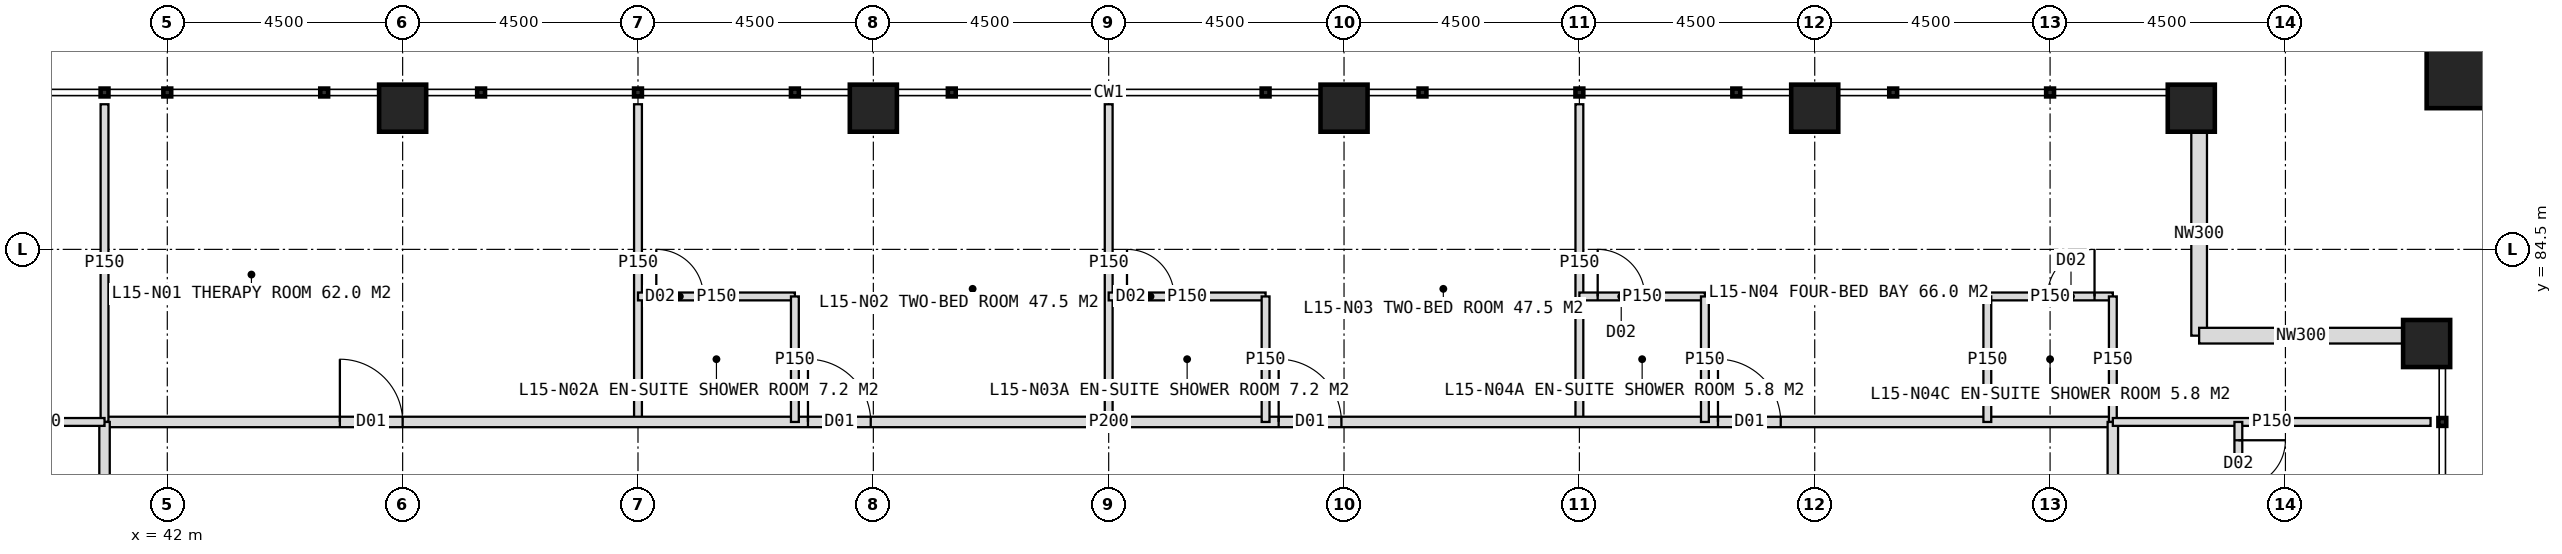
"""IFC4 building model, lengths in metres.
Left out: names, types, materials, properties, quantities, classifications, styles, units other than length and angle.
Written with IfcOpenShell. Run it as: python <this file> out.ifc"""

import sys

from ifc_helpers import new_model, si_unit, direction, frame, frame_2d, origin, origin_2d, place, context, subcontext, project, spatial, rectangle, hollow_rectangle, extrude, element, fill, save


model = new_model("IFC4")
c1 = context("Model", 3, precision=1e-05, world=origin(), true_north=direction((0.0, 1.0)))
c2 = subcontext(c1, "Body", "Model", "MODEL_VIEW")
j1 = project(units=[si_unit("LENGTHUNIT", "METRE"), si_unit("PLANEANGLEUNIT", "RADIAN")], contexts=[c1])
p1 = place(None, origin())
s1 = spatial("IfcSite", under=j1, at=p1, CompositionType="ELEMENT")
p2 = place(p1, origin())
s2 = spatial("IfcBuilding", under=s1, at=p2, CompositionType="ELEMENT")
p3 = place(p2, frame((0.0, 0.0, 67.0)))
s3 = spatial("IfcBuildingStorey", under=s2, at=p3, CompositionType="ELEMENT", Elevation=67.0)
for number, where, z_axis, x_axis in (
    (1, (46.5, 87.2, 0.0), (0.0, 0.0, 1.0), (1.0, 0.0, 0.0)),
    (2, (55.5, 87.2, 0.0), (0.0, 0.0, 1.0), (1.0, 0.0, 0.0)),
    (3, (64.5, 87.2, 0.0), (0.0, 0.0, 1.0), (1.0, 0.0, 0.0)),
    (4, (73.5, 87.2, 0.0), (0.0, 0.0, 1.0), (1.0, 0.0, 0.0)),
    (5, (80.7, 87.2, 0.0), (0.0, 0.0, 1.0), (1.0, 0.0, 0.0)),
    (6, (85.2, 82.7, 0.0), (0.0, 0.0, 1.0), (1.0, 0.0, 0.0)),
):
    element("IfcColumn", number, at=place(p3, frame(where, z_axis=z_axis, x_axis=x_axis)), inside=s3, PredefinedType="COLUMN", context=c2, shape_type="SweptSolid", body=[
        extrude(hollow_rectangle(XDim=0.9, YDim=0.9, WallThickness=0.08, at=origin_2d()), origin(), (0.0, 0.0, 1.0), 4.0),
    ])
p4 = place(p3, frame((86.1, 88.1, 0.0), z_axis=(0.0, 0.0, 1.0), x_axis=(1.0, 0.0, 0.0)))
e7 = element("IfcColumn", 7, at=p4, inside=s3, PredefinedType="COLUMN", context=c2, shape_type="SweptSolid", body=[
    extrude(hollow_rectangle(XDim=1.8, YDim=1.8, WallThickness=0.1, at=origin_2d()), origin(), (0.0, 0.0, 1.0), 4.0),
])
for number, where, z_axis, x_axis in (
    (8, (80.85, 86.75, 0.0), (0.0, 0.0, 1.0), (0.0, -1.0, 0.0)),
    (9, (80.85, 82.85, 0.0), (0.0, 0.0, 1.0), (1.0, 0.0, 0.0)),
):
    element("IfcWall", number, at=place(p3, frame(where, z_axis=z_axis, x_axis=x_axis)), inside=s3, PredefinedType="ELEMENTEDWALL", context=c2, shape_type="SweptSolid", body=[
        extrude(rectangle(XDim=3.9, YDim=0.3, at=frame_2d((1.95, 0.0))), origin(), (0.0, 0.0, 1.0), 2.95),
    ])
p5 = place(p3, frame((51.0, 81.2, 0.0), z_axis=(0.0, 0.0, 1.0), x_axis=(0.0, 1.0, 0.0)))
e10 = element("IfcWall", 10, at=p5, inside=s3, PredefinedType="PARTITIONING", context=c2, shape_type="SweptSolid", body=[
    extrude(rectangle(XDim=6.075, YDim=0.15, at=frame_2d((3.038, 0.0))), origin(), (0.0, 0.0, 1.0), 3.75),
])
p6 = place(p3, frame((60.0, 81.2, 0.0), z_axis=(0.0, 0.0, 1.0), x_axis=(0.0, 1.0, 0.0)))
e11 = element("IfcWall", 11, at=p6, inside=s3, PredefinedType="PARTITIONING", context=c2, shape_type="SweptSolid", body=[
    extrude(rectangle(XDim=6.075, YDim=0.15, at=frame_2d((3.038, 0.0))), origin(), (0.0, 0.0, 1.0), 2.75),
])
p7 = place(p3, frame((69.0, 81.2, 0.0), z_axis=(0.0, 0.0, 1.0), x_axis=(0.0, 1.0, 0.0)))
e12 = element("IfcWall", 12, at=p7, inside=s3, PredefinedType="PARTITIONING", context=c2, shape_type="SweptSolid", body=[
    extrude(rectangle(XDim=6.075, YDim=0.15, at=frame_2d((3.038, 0.0))), origin(), (0.0, 0.0, 1.0), 3.75),
])
p8 = place(p3, frame((40.8, 81.2, 0.0), z_axis=(0.0, 0.0, 1.0), x_axis=(1.0, 0.0, 0.0)))
e13 = element("IfcWall", 13, at=p8, inside=s3, PredefinedType="PARTITIONING", context=c2, shape_type="SweptSolid", body=[
    extrude(rectangle(XDim=38.4, YDim=0.2, at=frame_2d((19.2, 0.0))), origin(), (0.0, 0.0, 1.0), 3.75),
])
p9 = place(p8, frame((4.5, 0.0, 0.0)))
e14 = element("IfcOpeningElement", 14, at=p9, cuts=e13, PredefinedType="OPENING", context=c2, shape_type="SweptSolid", body=[
    extrude(rectangle(XDim=1.2, YDim=2.2, at=frame_2d((0.6, 1.1))), frame((0.0, 0.11, 0.0), z_axis=(0.0, -1.0, 0.0), x_axis=(1.0, 0.0, 0.0)), (0.0, 0.0, 1.0), 0.22),
])
p10 = place(p8, frame((13.45, 0.0, 0.0)))
e15 = element("IfcOpeningElement", 15, at=p10, cuts=e13, PredefinedType="OPENING", context=c2, shape_type="SweptSolid", body=[
    extrude(rectangle(XDim=1.2, YDim=2.2, at=frame_2d((0.6, 1.1))), frame((0.0, 0.11, 0.0), z_axis=(0.0, -1.0, 0.0), x_axis=(1.0, 0.0, 0.0)), (0.0, 0.0, 1.0), 0.22),
])
p11 = place(p8, frame((22.45, 0.0, 0.0)))
e16 = element("IfcOpeningElement", 16, at=p11, cuts=e13, PredefinedType="OPENING", context=c2, shape_type="SweptSolid", body=[
    extrude(rectangle(XDim=1.2, YDim=2.2, at=frame_2d((0.6, 1.1))), frame((0.0, 0.11, 0.0), z_axis=(0.0, -1.0, 0.0), x_axis=(1.0, 0.0, 0.0)), (0.0, 0.0, 1.0), 0.22),
])
p12 = place(p8, frame((30.85, 0.0, 0.0)))
e17 = element("IfcOpeningElement", 17, at=p12, cuts=e13, PredefinedType="OPENING", context=c2, shape_type="SweptSolid", body=[
    extrude(rectangle(XDim=1.2, YDim=2.2, at=frame_2d((0.6, 1.1))), frame((0.0, 0.11, 0.0), z_axis=(0.0, -1.0, 0.0), x_axis=(1.0, 0.0, 0.0)), (0.0, 0.0, 1.0), 0.22),
])
p13 = place(p3, frame((40.8, 81.2, 0.0), z_axis=(0.0, 0.0, 1.0), x_axis=(0.0, 1.0, 0.0)))
e18 = element("IfcWall", 18, at=p13, inside=s3, PredefinedType="PARTITIONING", context=c2, shape_type="SweptSolid", body=[
    extrude(rectangle(XDim=6.075, YDim=0.15, at=frame_2d((3.038, 0.0))), origin(), (0.0, 0.0, 1.0), 3.75),
])
p14 = place(p3, frame((51.0, 83.6, 0.0), z_axis=(0.0, 0.0, 1.0), x_axis=(1.0, 0.0, 0.0)))
e19 = element("IfcWall", 19, at=p14, inside=s3, PredefinedType="PARTITIONING", context=c2, shape_type="SweptSolid", body=[
    extrude(rectangle(XDim=3.0, YDim=0.15, at=frame_2d((1.5, 0.0))), origin(), (0.0, 0.0, 1.0), 3.75),
])
p15 = place(p14, frame((0.35, 0.0, 0.0)))
e20 = element("IfcOpeningElement", 20, at=p15, cuts=e19, PredefinedType="OPENING", context=c2, shape_type="SweptSolid", body=[
    extrude(rectangle(XDim=0.9, YDim=2.1, at=frame_2d((0.45, 1.05))), frame((0.0, 0.085, 0.0), z_axis=(0.0, -1.0, 0.0), x_axis=(1.0, 0.0, 0.0)), (0.0, 0.0, 1.0), 0.17),
])
p16 = place(p3, frame((54.0, 81.2, 0.0), z_axis=(0.0, 0.0, 1.0), x_axis=(0.0, 1.0, 0.0)))
e21 = element("IfcWall", 21, at=p16, inside=s3, PredefinedType="PARTITIONING", context=c2, shape_type="SweptSolid", body=[
    extrude(rectangle(XDim=2.4, YDim=0.15, at=frame_2d((1.2, 0.0))), origin(), (0.0, 0.0, 1.0), 3.75),
])
p17 = place(p3, frame((60.0, 83.6, 0.0), z_axis=(0.0, 0.0, 1.0), x_axis=(1.0, 0.0, 0.0)))
e22 = element("IfcWall", 22, at=p17, inside=s3, PredefinedType="PARTITIONING", context=c2, shape_type="SweptSolid", body=[
    extrude(rectangle(XDim=3.0, YDim=0.15, at=frame_2d((1.5, 0.0))), origin(), (0.0, 0.0, 1.0), 3.75),
])
p18 = place(p17, frame((0.35, 0.0, 0.0)))
e23 = element("IfcOpeningElement", 23, at=p18, cuts=e22, PredefinedType="OPENING", context=c2, shape_type="SweptSolid", body=[
    extrude(rectangle(XDim=0.9, YDim=2.1, at=frame_2d((0.45, 1.05))), frame((0.0, 0.085, 0.0), z_axis=(0.0, -1.0, 0.0), x_axis=(1.0, 0.0, 0.0)), (0.0, 0.0, 1.0), 0.17),
])
p19 = place(p3, frame((63.0, 81.2, 0.0), z_axis=(0.0, 0.0, 1.0), x_axis=(0.0, 1.0, 0.0)))
e24 = element("IfcWall", 24, at=p19, inside=s3, PredefinedType="PARTITIONING", context=c2, shape_type="SweptSolid", body=[
    extrude(rectangle(XDim=2.4, YDim=0.15, at=frame_2d((1.2, 0.0))), origin(), (0.0, 0.0, 1.0), 3.75),
])
p20 = place(p3, frame((69.0, 83.6, 0.0), z_axis=(0.0, 0.0, 1.0), x_axis=(1.0, 0.0, 0.0)))
e25 = element("IfcWall", 25, at=p20, inside=s3, PredefinedType="PARTITIONING", context=c2, shape_type="SweptSolid", body=[
    extrude(rectangle(XDim=2.4, YDim=0.15, at=frame_2d((1.2, 0.0))), origin(), (0.0, 0.0, 1.0), 3.75),
])
p21 = place(p20, frame((0.35, 0.0, 0.0)))
e26 = element("IfcOpeningElement", 26, at=p21, cuts=e25, PredefinedType="OPENING", context=c2, shape_type="SweptSolid", body=[
    extrude(rectangle(XDim=0.9, YDim=2.1, at=frame_2d((0.45, 1.05))), frame((0.0, 0.085, 0.0), z_axis=(0.0, -1.0, 0.0), x_axis=(1.0, 0.0, 0.0)), (0.0, 0.0, 1.0), 0.17),
])
p22 = place(p3, frame((71.4, 81.2, 0.0), z_axis=(0.0, 0.0, 1.0), x_axis=(0.0, 1.0, 0.0)))
e27 = element("IfcWall", 27, at=p22, inside=s3, PredefinedType="PARTITIONING", context=c2, shape_type="SweptSolid", body=[
    extrude(rectangle(XDim=2.4, YDim=0.15, at=frame_2d((1.2, 0.0))), origin(), (0.0, 0.0, 1.0), 3.75),
])
p23 = place(p3, frame((76.8, 83.6, 0.0), z_axis=(0.0, 0.0, 1.0), x_axis=(1.0, 0.0, 0.0)))
e28 = element("IfcWall", 28, at=p23, inside=s3, PredefinedType="PARTITIONING", context=c2, shape_type="SweptSolid", body=[
    extrude(rectangle(XDim=2.4, YDim=0.15, at=frame_2d((1.2, 0.0))), origin(), (0.0, 0.0, 1.0), 3.75),
])
p24 = place(p23, frame((1.15, 0.0, 0.0)))
e29 = element("IfcOpeningElement", 29, at=p24, cuts=e28, PredefinedType="OPENING", context=c2, shape_type="SweptSolid", body=[
    extrude(rectangle(XDim=0.9, YDim=2.1, at=frame_2d((0.45, 1.05))), frame((0.0, 0.085, 0.0), z_axis=(0.0, -1.0, 0.0), x_axis=(1.0, 0.0, 0.0)), (0.0, 0.0, 1.0), 0.17),
])
for number, where, z_axis, x_axis in (
    (30, (76.8, 81.2, 0.0), (0.0, 0.0, 1.0), (0.0, 1.0, 0.0)),
    (31, (79.2, 81.2, 0.0), (0.0, 0.0, 1.0), (0.0, 1.0, 0.0)),
):
    element("IfcWall", number, at=place(p3, frame(where, z_axis=z_axis, x_axis=x_axis)), inside=s3, PredefinedType="PARTITIONING", context=c2, shape_type="SweptSolid", body=[
        extrude(rectangle(XDim=2.4, YDim=0.15, at=frame_2d((1.2, 0.0))), origin(), (0.0, 0.0, 1.0), 3.75),
    ])
p25 = place(p3, frame((40.8, 42.8, 0.0), z_axis=(0.0, 0.0, 1.0), x_axis=(0.0, 1.0, 0.0)))
e32 = element("IfcWall", 32, at=p25, inside=s3, PredefinedType="PARTITIONING", context=c2, shape_type="SweptSolid", body=[
    extrude(rectangle(XDim=38.4, YDim=0.2, at=frame_2d((19.2, 0.0))), origin(), (0.0, 0.0, 1.0), 3.75),
])
p26 = place(p25, frame((3.25, 0.0, 0.0)))
e33 = element("IfcOpeningElement", 33, at=p26, cuts=e32, PredefinedType="OPENING", context=c2, shape_type="SweptSolid", body=[
    extrude(rectangle(XDim=1.2, YDim=2.2, at=frame_2d((0.6, 1.1))), frame((0.0, 0.11, 0.0), z_axis=(0.0, -1.0, 0.0), x_axis=(1.0, 0.0, 0.0)), (0.0, 0.0, 1.0), 0.22),
])
p27 = place(p25, frame((9.85, 0.0, 0.0)))
e34 = element("IfcOpeningElement", 34, at=p27, cuts=e32, PredefinedType="OPENING", context=c2, shape_type="SweptSolid", body=[
    extrude(rectangle(XDim=1.2, YDim=2.2, at=frame_2d((0.6, 1.1))), frame((0.0, 0.11, 0.0), z_axis=(0.0, -1.0, 0.0), x_axis=(1.0, 0.0, 0.0)), (0.0, 0.0, 1.0), 0.22),
])
p28 = place(p25, frame((15.85, 0.0, 0.0)))
e35 = element("IfcOpeningElement", 35, at=p28, cuts=e32, PredefinedType="OPENING", context=c2, shape_type="SweptSolid", body=[
    extrude(rectangle(XDim=1.2, YDim=2.2, at=frame_2d((0.6, 1.1))), frame((0.0, 0.11, 0.0), z_axis=(0.0, -1.0, 0.0), x_axis=(1.0, 0.0, 0.0)), (0.0, 0.0, 1.0), 0.22),
])
p29 = place(p25, frame((22.45, 0.0, 0.0)))
e36 = element("IfcOpeningElement", 36, at=p29, cuts=e32, PredefinedType="OPENING", context=c2, shape_type="SweptSolid", body=[
    extrude(rectangle(XDim=1.2, YDim=2.2, at=frame_2d((0.6, 1.1))), frame((0.0, 0.11, 0.0), z_axis=(0.0, -1.0, 0.0), x_axis=(1.0, 0.0, 0.0)), (0.0, 0.0, 1.0), 0.22),
])
p30 = place(p25, frame((30.85, 0.0, 0.0)))
e37 = element("IfcOpeningElement", 37, at=p30, cuts=e32, PredefinedType="OPENING", context=c2, shape_type="SweptSolid", body=[
    extrude(rectangle(XDim=1.2, YDim=2.2, at=frame_2d((0.6, 1.1))), frame((0.0, 0.11, 0.0), z_axis=(0.0, -1.0, 0.0), x_axis=(1.0, 0.0, 0.0)), (0.0, 0.0, 1.0), 0.22),
])
p31 = place(p3, frame((40.8, 81.2, 0.0), z_axis=(0.0, 0.0, 1.0), x_axis=(-1.0, 0.0, 0.0)))
e38 = element("IfcWall", 38, at=p31, inside=s3, PredefinedType="PARTITIONING", context=c2, shape_type="SweptSolid", body=[
    extrude(rectangle(XDim=2.4, YDim=0.15, at=frame_2d((1.2, 0.0))), origin(), (0.0, 0.0, 1.0), 3.75),
])
p32 = place(p3, frame((79.2, 81.2, 0.0), z_axis=(0.0, 0.0, 1.0), x_axis=(0.0, -1.0, 0.0)))
e39 = element("IfcWall", 39, at=p32, inside=s3, PredefinedType="PARTITIONING", context=c2, shape_type="SweptSolid", body=[
    extrude(rectangle(XDim=38.4, YDim=0.2, at=frame_2d((19.2, 0.0))), origin(), (0.0, 0.0, 1.0), 3.75),
])
p33 = place(p32, frame((3.25, 0.0, 0.0)))
e40 = element("IfcOpeningElement", 40, at=p33, cuts=e39, PredefinedType="OPENING", context=c2, shape_type="SweptSolid", body=[
    extrude(rectangle(XDim=1.2, YDim=2.2, at=frame_2d((0.6, 1.1))), frame((0.0, 0.11, 0.0), z_axis=(0.0, -1.0, 0.0), x_axis=(1.0, 0.0, 0.0)), (0.0, 0.0, 1.0), 0.22),
])
p34 = place(p32, frame((13.45, 0.0, 0.0)))
e41 = element("IfcOpeningElement", 41, at=p34, cuts=e39, PredefinedType="OPENING", context=c2, shape_type="SweptSolid", body=[
    extrude(rectangle(XDim=1.2, YDim=2.2, at=frame_2d((0.6, 1.1))), frame((0.0, 0.11, 0.0), z_axis=(0.0, -1.0, 0.0), x_axis=(1.0, 0.0, 0.0)), (0.0, 0.0, 1.0), 0.22),
])
p35 = place(p32, frame((21.85, 0.0, 0.0)))
e42 = element("IfcOpeningElement", 42, at=p35, cuts=e39, PredefinedType="OPENING", context=c2, shape_type="SweptSolid", body=[
    extrude(rectangle(XDim=1.2, YDim=2.2, at=frame_2d((0.6, 1.1))), frame((0.0, 0.11, 0.0), z_axis=(0.0, -1.0, 0.0), x_axis=(1.0, 0.0, 0.0)), (0.0, 0.0, 1.0), 0.22),
])
p36 = place(p32, frame((27.85, 0.0, 0.0)))
e43 = element("IfcOpeningElement", 43, at=p36, cuts=e39, PredefinedType="OPENING", context=c2, shape_type="SweptSolid", body=[
    extrude(rectangle(XDim=1.2, YDim=2.2, at=frame_2d((0.6, 1.1))), frame((0.0, 0.11, 0.0), z_axis=(0.0, -1.0, 0.0), x_axis=(1.0, 0.0, 0.0)), (0.0, 0.0, 1.0), 0.22),
])
p37 = place(p3, frame((79.2, 81.2, 0.0), z_axis=(0.0, 0.0, 1.0), x_axis=(1.0, 0.0, 0.0)))
e44 = element("IfcWall", 44, at=p37, inside=s3, PredefinedType="PARTITIONING", context=c2, shape_type="SweptSolid", body=[
    extrude(rectangle(XDim=6.075, YDim=0.15, at=frame_2d((3.038, 0.0))), origin(), (0.0, 0.0, 1.0), 3.75),
])
p38 = place(p3, frame((81.6, 81.2, 0.0), z_axis=(0.0, 0.0, 1.0), x_axis=(0.0, -1.0, 0.0)))
e45 = element("IfcWall", 45, at=p38, inside=s3, PredefinedType="PARTITIONING", context=c2, shape_type="SweptSolid", body=[
    extrude(rectangle(XDim=3.0, YDim=0.15, at=frame_2d((1.5, 0.0))), origin(), (0.0, 0.0, 1.0), 3.75),
])
p39 = place(p38, frame((0.35, 0.0, 0.0)))
e46 = element("IfcOpeningElement", 46, at=p39, cuts=e45, PredefinedType="OPENING", context=c2, shape_type="SweptSolid", body=[
    extrude(rectangle(XDim=0.9, YDim=2.1, at=frame_2d((0.45, 1.05))), frame((0.0, 0.085, 0.0), z_axis=(0.0, -1.0, 0.0), x_axis=(1.0, 0.0, 0.0)), (0.0, 0.0, 1.0), 0.17),
])
p40 = place(p9, origin())
e47 = element("IfcDoor", 47, at=p40, inside=s3, OperationType="SINGLE_SWING_LEFT", PredefinedType="DOOR", context=c2, shape_type="SweptSolid", body=[
    extrude(rectangle(XDim=1.2, YDim=2.2, at=frame_2d((0.6, 1.1))), frame((0.0, 0.025, 0.0), z_axis=(0.0, -1.0, 0.0), x_axis=(1.0, 0.0, 0.0)), (0.0, 0.0, 1.0), 0.05),
])
fill(e14, e47)
p41 = place(p10, origin())
e48 = element("IfcDoor", 48, at=p41, inside=s3, OperationType="SINGLE_SWING_LEFT", PredefinedType="DOOR", context=c2, shape_type="SweptSolid", body=[
    extrude(rectangle(XDim=1.2, YDim=2.2, at=frame_2d((0.6, 1.1))), frame((0.0, 0.025, 0.0), z_axis=(0.0, -1.0, 0.0), x_axis=(1.0, 0.0, 0.0)), (0.0, 0.0, 1.0), 0.05),
])
fill(e15, e48)
p42 = place(p15, origin())
e49 = element("IfcDoor", 49, at=p42, inside=s3, OperationType="SINGLE_SWING_LEFT", PredefinedType="DOOR", context=c2, shape_type="SweptSolid", body=[
    extrude(rectangle(XDim=0.9, YDim=2.1, at=frame_2d((0.45, 1.05))), frame((0.0, 0.025, 0.0), z_axis=(0.0, -1.0, 0.0), x_axis=(1.0, 0.0, 0.0)), (0.0, 0.0, 1.0), 0.05),
])
fill(e20, e49)
p43 = place(p11, origin())
e50 = element("IfcDoor", 50, at=p43, inside=s3, OperationType="SINGLE_SWING_LEFT", PredefinedType="DOOR", context=c2, shape_type="SweptSolid", body=[
    extrude(rectangle(XDim=1.2, YDim=2.2, at=frame_2d((0.6, 1.1))), frame((0.0, 0.025, 0.0), z_axis=(0.0, -1.0, 0.0), x_axis=(1.0, 0.0, 0.0)), (0.0, 0.0, 1.0), 0.05),
])
fill(e16, e50)
p44 = place(p18, origin())
e51 = element("IfcDoor", 51, at=p44, inside=s3, OperationType="SINGLE_SWING_LEFT", PredefinedType="DOOR", context=c2, shape_type="SweptSolid", body=[
    extrude(rectangle(XDim=0.9, YDim=2.1, at=frame_2d((0.45, 1.05))), frame((0.0, 0.025, 0.0), z_axis=(0.0, -1.0, 0.0), x_axis=(1.0, 0.0, 0.0)), (0.0, 0.0, 1.0), 0.05),
])
fill(e23, e51)
p45 = place(p12, origin())
e52 = element("IfcDoor", 52, at=p45, inside=s3, OperationType="SINGLE_SWING_LEFT", PredefinedType="DOOR", context=c2, shape_type="SweptSolid", body=[
    extrude(rectangle(XDim=1.2, YDim=2.2, at=frame_2d((0.6, 1.1))), frame((0.0, 0.025, 0.0), z_axis=(0.0, -1.0, 0.0), x_axis=(1.0, 0.0, 0.0)), (0.0, 0.0, 1.0), 0.05),
])
fill(e17, e52)
p46 = place(p21, origin())
e53 = element("IfcDoor", 53, at=p46, inside=s3, OperationType="SINGLE_SWING_LEFT", PredefinedType="DOOR", context=c2, shape_type="SweptSolid", body=[
    extrude(rectangle(XDim=0.9, YDim=2.1, at=frame_2d((0.45, 1.05))), frame((0.0, 0.025, 0.0), z_axis=(0.0, -1.0, 0.0), x_axis=(1.0, 0.0, 0.0)), (0.0, 0.0, 1.0), 0.05),
])
fill(e26, e53)
p47 = place(p24, origin())
e54 = element("IfcDoor", 54, at=p47, inside=s3, OperationType="SINGLE_SWING_RIGHT", PredefinedType="DOOR", context=c2, shape_type="SweptSolid", body=[
    extrude(rectangle(XDim=0.9, YDim=2.1, at=frame_2d((0.45, 1.05))), frame((0.0, 0.025, 0.0), z_axis=(0.0, -1.0, 0.0), x_axis=(1.0, 0.0, 0.0)), (0.0, 0.0, 1.0), 0.05),
])
fill(e29, e54)
p48 = place(p39, origin())
e55 = element("IfcDoor", 55, at=p48, inside=s3, OperationType="SINGLE_SWING_LEFT", PredefinedType="DOOR", context=c2, shape_type="SweptSolid", body=[
    extrude(rectangle(XDim=0.9, YDim=2.1, at=frame_2d((0.45, 1.05))), frame((0.0, 0.025, 0.0), z_axis=(0.0, -1.0, 0.0), x_axis=(1.0, 0.0, 0.0)), (0.0, 0.0, 1.0), 0.05),
])
fill(e46, e55)
save(model, sys.argv[1])
